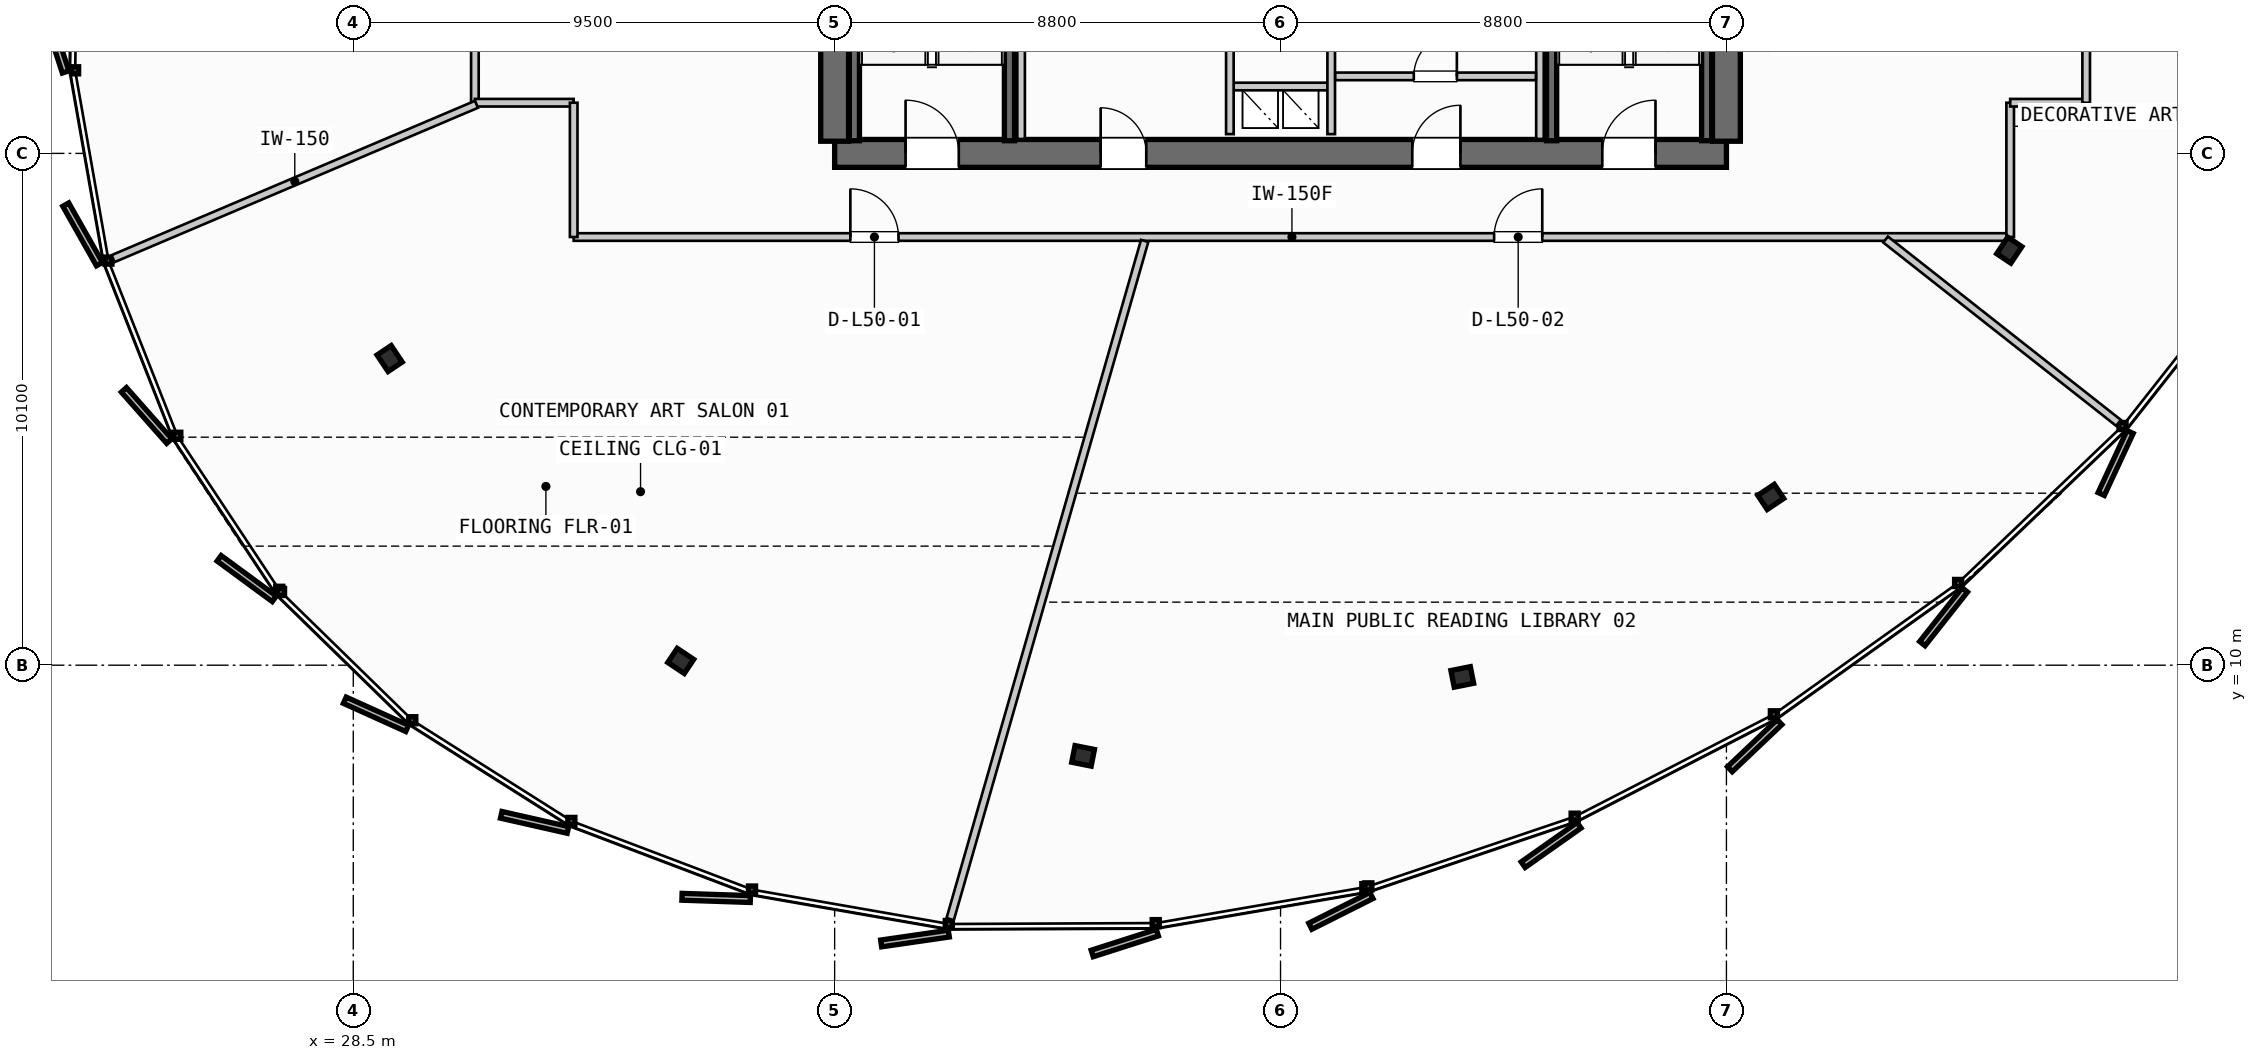
"""IFC4 building model, lengths in metres.
Left out: names, types, materials, properties, quantities, classifications, styles, units other than length and angle.
Written with IfcOpenShell. Run it as: python <this file> out.ifc"""

import sys

from ifc_helpers import new_model, si_unit, direction, frame, frame_2d, origin, origin_2d, place, context, subcontext, project, spatial, rectangle, i_section, extrude, source, transform, mapped, element, fill, save


model = new_model("IFC4")
c1 = context("Model", 3, precision=1e-05, world=origin(), true_north=direction((0.0, 1.0)))
c2 = subcontext(c1, "Body", "Model", "MODEL_VIEW")
j1 = project(units=[si_unit("LENGTHUNIT", "METRE"), si_unit("PLANEANGLEUNIT", "RADIAN")], contexts=[c1])
p1 = place(None, origin())
s1 = spatial("IfcSite", under=j1, at=p1, CompositionType="ELEMENT")
p2 = place(p1, origin())
s2 = spatial("IfcBuilding", under=s1, at=p2, CompositionType="ELEMENT")
p3 = place(p2, frame((0.0, 0.0, 193.9)))
s3 = spatial("IfcBuildingStorey", under=s2, at=p3, CompositionType="ELEMENT", Elevation=193.9)
p4 = place(p3, frame((38.0, 20.1, 0.0), z_axis=(0.0, 0.0, 1.0), x_axis=(1.0, 0.0, 0.0)))
e1 = element("IfcWall", 1, at=p4, inside=s3, PredefinedType="SHEAR", context=c2, shape_type="SweptSolid", body=[
    extrude(rectangle(XDim=17.6, YDim=0.55, at=frame_2d((8.8, 0.0))), origin(), (0.0, 0.0, 1.0), 3.26),
])
p5 = place(p4, frame((1.4, 0.0, 0.0)))
e2 = element("IfcOpeningElement", 2, at=p5, cuts=e1, PredefinedType="OPENING", context=c2, shape_type="SweptSolid", body=[
    extrude(rectangle(XDim=1.05, YDim=2.15, at=frame_2d((0.525, 1.075))), frame((0.0, 0.285, 0.0), z_axis=(0.0, -1.0, 0.0), x_axis=(1.0, 0.0, 0.0)), (0.0, 0.0, 1.0), 0.57),
])
p6 = place(p4, frame((15.15, 0.0, 0.0)))
e3 = element("IfcOpeningElement", 3, at=p6, cuts=e1, PredefinedType="OPENING", context=c2, shape_type="SweptSolid", body=[
    extrude(rectangle(XDim=1.05, YDim=2.15, at=frame_2d((0.525, 1.075))), frame((0.0, 0.285, 0.0), z_axis=(0.0, -1.0, 0.0), x_axis=(1.0, 0.0, 0.0)), (0.0, 0.0, 1.0), 0.57),
])
p7 = place(p4, frame((5.25, 0.0, 0.0)))
e4 = element("IfcOpeningElement", 4, at=p7, cuts=e1, PredefinedType="OPENING", context=c2, shape_type="SweptSolid", body=[
    extrude(rectangle(XDim=0.9, YDim=2.15, at=frame_2d((0.45, 1.075))), frame((0.0, 0.285, 0.0), z_axis=(0.0, -1.0, 0.0), x_axis=(1.0, 0.0, 0.0)), (0.0, 0.0, 1.0), 0.57),
])
p8 = place(p4, frame((11.4, 0.0, 0.0)))
e5 = element("IfcOpeningElement", 5, at=p8, cuts=e1, PredefinedType="OPENING", context=c2, shape_type="SweptSolid", body=[
    extrude(rectangle(XDim=0.95, YDim=2.15, at=frame_2d((0.475, 1.075))), frame((0.0, 0.285, 0.0), z_axis=(0.0, -1.0, 0.0), x_axis=(1.0, 0.0, 0.0)), (0.0, 0.0, 1.0), 0.57),
])
p9 = place(p3, frame((38.0, 35.26, 0.0), z_axis=(0.0, 0.0, 1.0), x_axis=(0.0, -1.0, 0.0)))
e6 = element("IfcWall", 6, at=p9, inside=s3, PredefinedType="SHEAR", context=c2, shape_type="SweptSolid", body=[
    extrude(rectangle(XDim=14.92, YDim=0.55, at=frame_2d((7.46, 0.0))), origin(), (0.0, 0.0, 1.0), 3.26),
])
p10 = place(p9, frame((5.21, 0.0, 0.0)))
e7 = element("IfcOpeningElement", 7, at=p10, cuts=e6, PredefinedType="OPENING", context=c2, shape_type="SweptSolid", body=[
    extrude(rectangle(XDim=1.1, YDim=2.2, at=frame_2d((0.55, 1.1))), frame((0.0, 0.285, 0.0), z_axis=(0.0, -1.0, 0.0), x_axis=(1.0, 0.0, 0.0)), (0.0, 0.0, 1.0), 0.57),
])
p11 = place(p3, frame((55.6, 20.34, 0.0), z_axis=(0.0, 0.0, 1.0), x_axis=(0.0, 1.0, 0.0)))
e8 = element("IfcWall", 8, at=p11, inside=s3, PredefinedType="SHEAR", context=c2, shape_type="SweptSolid", body=[
    extrude(rectangle(XDim=14.92, YDim=0.55, at=frame_2d((7.46, 0.0))), origin(), (0.0, 0.0, 1.0), 3.26),
])
p12 = place(p11, frame((12.71, 0.0, 0.0)))
e9 = element("IfcOpeningElement", 9, at=p12, cuts=e8, PredefinedType="OPENING", context=c2, shape_type="SweptSolid", body=[
    extrude(rectangle(XDim=1.05, YDim=2.15, at=frame_2d((0.525, 1.075))), frame((0.0, 0.285, 0.0), z_axis=(0.0, -1.0, 0.0), x_axis=(1.0, 0.0, 0.0)), (0.0, 0.0, 1.0), 0.57),
])
p13 = place(p11, frame((8.61, 0.0, 0.0)))
e10 = element("IfcOpeningElement", 10, at=p13, cuts=e8, PredefinedType="OPENING", context=c2, shape_type="SweptSolid", body=[
    extrude(rectangle(XDim=1.1, YDim=2.2, at=frame_2d((0.55, 1.1))), frame((0.0, 0.285, 0.0), z_axis=(0.0, -1.0, 0.0), x_axis=(1.0, 0.0, 0.0)), (0.0, 0.0, 1.0), 0.57),
])
m1 = source(origin(), c2, "Body", "SweptSolid", [
    extrude(i_section(OverallWidth=0.391, OverallDepth=0.335, WebThickness=0.023, FlangeThickness=0.034, FilletRadius=0.015, at=origin_2d()), origin(), (0.0, 0.0, 1.0), 3.26),
])
for number, where, z_axis, x_axis in (
    (11, (29.218, 16.052, 0.0), (0.0, 0.0, 1.0), (-0.831, -0.556, 0.0)),
    (12, (34.963, 10.084, 0.0), (0.0, 0.0, 1.0), (-0.556, -0.831, 0.0)),
    (13, (42.904, 8.211, 0.0), (0.0, 0.0, 1.0), (-0.195, -0.981, 0.0)),
    (14, (50.387, 9.769, 0.0), (0.0, 0.0, 1.0), (0.195, -0.981, 0.0)),
    (15, (56.475, 13.321, 0.0), (0.0, 0.0, 1.0), (0.556, -0.831, 0.0)),
    (16, (61.183, 18.19, 0.0), (0.0, 0.0, 1.0), (0.831, -0.556, 0.0)),
):
    element("IfcColumn", number, at=place(p3, frame(where, z_axis=z_axis, x_axis=x_axis)), inside=s3, PredefinedType="COLUMN", context=c2, shape_type="MappedRepresentation", body=[
        mapped(m1, transform((0.0, 0.0, 0.0), scale=1.0)),
    ])
for number, where, z_axis, x_axis in (
    (17, (41.45, 27.7, 0.0), (0.0, 0.0, 1.0), (0.0, -1.0, 0.0)),
    (18, (38.39, 20.35, 0.0), (0.0, 0.0, 1.0), (0.0, 1.0, 0.0)),
    (19, (55.21, 27.7, 0.0), (0.0, 0.0, 1.0), (0.0, -1.0, 0.0)),
    (20, (52.15, 20.35, 0.0), (0.0, 0.0, 1.0), (0.0, 1.0, 0.0)),
):
    element("IfcWall", number, at=place(p3, frame(where, z_axis=z_axis, x_axis=x_axis)), inside=s3, PredefinedType="SHEAR", context=c2, shape_type="SweptSolid", body=[
        extrude(rectangle(XDim=7.35, YDim=0.2, at=frame_2d((3.675, 0.0))), origin(), (0.0, 0.0, 1.0), 3.26),
    ])
p14 = place(p3, frame((45.8, 21.42, 0.0), z_axis=(0.0, 0.0, 1.0), x_axis=(1.0, 0.0, 0.0)))
e21 = element("IfcWall", 21, at=p14, inside=s3, PredefinedType="PARTITIONING", context=c2, shape_type="SweptSolid", body=[
    extrude(rectangle(XDim=2.0, YDim=0.15, at=frame_2d((1.0, 0.0))), origin(), (0.0, 0.0, 1.0), 2.735),
])
for number, where, z_axis, x_axis in (
    (22, (45.8, 20.48, 0.0), (0.0, 0.0, 1.0), (0.0, 1.0, 0.0)),
    (23, (47.8, 20.48, 0.0), (0.0, 0.0, 1.0), (0.0, 1.0, 0.0)),
):
    element("IfcWall", number, at=place(p3, frame(where, z_axis=z_axis, x_axis=x_axis)), inside=s3, PredefinedType="PARTITIONING", context=c2, shape_type="SweptSolid", body=[
        extrude(rectangle(XDim=2.24, YDim=0.15, at=frame_2d((1.12, 0.0))), origin(), (0.0, 0.0, 1.0), 2.735),
    ])
for number, where, z_axis, x_axis in (
    (24, (41.68, 20.385, 0.0), (0.0, 0.0, 1.0), (0.0, 1.0, 0.0)),
    (25, (51.92, 20.385, 0.0), (0.0, 0.0, 1.0), (0.0, 1.0, 0.0)),
):
    element("IfcWall", number, at=place(p3, frame(where, z_axis=z_axis, x_axis=x_axis)), inside=s3, PredefinedType="PARTITIONING", context=c2, shape_type="SweptSolid", body=[
        extrude(rectangle(XDim=2.345, YDim=0.15, at=frame_2d((1.172, 0.0))), origin(), (0.0, 0.0, 1.0), 2.735),
    ])
p15 = place(p3, frame((47.88, 21.62, 0.0), z_axis=(0.0, 0.0, 1.0), x_axis=(1.0, 0.0, 0.0)))
e26 = element("IfcWall", 26, at=p15, inside=s3, PredefinedType="PARTITIONING", context=c2, shape_type="SweptSolid", body=[
    extrude(rectangle(XDim=3.96, YDim=0.15, at=frame_2d((1.98, 0.0))), origin(), (0.0, 0.0, 1.0), 2.735),
])
p16 = place(p15, frame((1.55, 0.0, 0.0)))
e27 = element("IfcOpeningElement", 27, at=p16, cuts=e26, PredefinedType="OPENING", context=c2, shape_type="SweptSolid", body=[
    extrude(rectangle(XDim=0.85, YDim=2.15, at=frame_2d((0.425, 1.075))), frame((0.0, 0.085, 0.0), z_axis=(0.0, -1.0, 0.0), x_axis=(1.0, 0.0, 0.0)), (0.0, 0.0, 1.0), 0.17),
])
p17 = place(p3, frame((32.85, 18.45, 0.0), z_axis=(0.0, 0.0, 1.0), x_axis=(1.0, 0.0, 0.0)))
e28 = element("IfcWall", 28, at=p17, inside=s3, PredefinedType="PARTITIONING", context=c2, shape_type="SweptSolid", body=[
    extrude(rectangle(XDim=28.35, YDim=0.15, at=frame_2d((14.175, 0.0))), origin(), (0.0, 0.0, 1.0), 2.735),
])
p18 = place(p17, frame((5.46, 0.0, 0.0)))
e29 = element("IfcOpeningElement", 29, at=p18, cuts=e28, PredefinedType="OPENING", context=c2, shape_type="SweptSolid", body=[
    extrude(rectangle(XDim=0.95, YDim=2.15, at=frame_2d((0.475, 1.075))), frame((0.0, 0.085, 0.0), z_axis=(0.0, -1.0, 0.0), x_axis=(1.0, 0.0, 0.0)), (0.0, 0.0, 1.0), 0.17),
])
p19 = place(p17, frame((18.165, 0.0, 0.0)))
e30 = element("IfcOpeningElement", 30, at=p19, cuts=e28, PredefinedType="OPENING", context=c2, shape_type="SweptSolid", body=[
    extrude(rectangle(XDim=0.95, YDim=2.15, at=frame_2d((0.475, 1.075))), frame((0.0, 0.085, 0.0), z_axis=(0.0, -1.0, 0.0), x_axis=(1.0, 0.0, 0.0)), (0.0, 0.0, 1.0), 0.17),
])
p20 = place(p3, frame((61.2, 18.45, 0.0), z_axis=(0.0, 0.0, 1.0), x_axis=(0.0, 1.0, 0.0)))
e31 = element("IfcWall", 31, at=p20, inside=s3, PredefinedType="PARTITIONING", context=c2, shape_type="SweptSolid", body=[
    extrude(rectangle(XDim=2.65, YDim=0.15, at=frame_2d((1.325, 0.0))), origin(), (0.0, 0.0, 1.0), 2.735),
])
p21 = place(p3, frame((61.2, 21.1, 0.0), z_axis=(0.0, 0.0, 1.0), x_axis=(1.0, 0.0, 0.0)))
e32 = element("IfcWall", 32, at=p21, inside=s3, PredefinedType="PARTITIONING", context=c2, shape_type="SweptSolid", body=[
    extrude(rectangle(XDim=1.5, YDim=0.15, at=frame_2d((0.75, 0.0))), origin(), (0.0, 0.0, 1.0), 2.735),
])
for number, where, z_axis, x_axis in (
    (33, (62.7, 21.1, 0.0), (0.0, 0.0, 1.0), (0.0, 1.0, 0.0)),
    (34, (30.9, 22.8, 0.0), (0.0, 0.0, 1.0), (0.0, -1.0, 0.0)),
):
    element("IfcWall", number, at=place(p3, frame(where, z_axis=z_axis, x_axis=x_axis)), inside=s3, PredefinedType="PARTITIONING", context=c2, shape_type="SweptSolid", body=[
        extrude(rectangle(XDim=1.7, YDim=0.15, at=frame_2d((0.85, 0.0))), origin(), (0.0, 0.0, 1.0), 2.735),
    ])
p22 = place(p3, frame((30.9, 21.1, 0.0), z_axis=(0.0, 0.0, 1.0), x_axis=(1.0, 0.0, 0.0)))
e35 = element("IfcWall", 35, at=p22, inside=s3, PredefinedType="PARTITIONING", context=c2, shape_type="SweptSolid", body=[
    extrude(rectangle(XDim=1.95, YDim=0.15, at=frame_2d((0.975, 0.0))), origin(), (0.0, 0.0, 1.0), 2.735),
])
p23 = place(p3, frame((32.85, 21.1, 0.0), z_axis=(0.0, 0.0, 1.0), x_axis=(0.0, -1.0, 0.0)))
e36 = element("IfcWall", 36, at=p23, inside=s3, PredefinedType="PARTITIONING", context=c2, shape_type="SweptSolid", body=[
    extrude(rectangle(XDim=2.65, YDim=0.15, at=frame_2d((1.325, 0.0))), origin(), (0.0, 0.0, 1.0), 2.735),
])
p24 = place(p3, frame((30.932, 21.069, 0.0), z_axis=(0.0, 0.0, 1.0), x_axis=(-0.920468749574, -0.390816172973, 0.0)))
e37 = element("IfcWall", 37, at=p24, inside=s3, PredefinedType="PARTITIONING", context=c2, shape_type="SweptSolid", body=[
    extrude(rectangle(XDim=7.792, YDim=0.15, at=frame_2d((3.896, 0.0))), origin(), (0.0, 0.0, 1.0), 2.735),
])
p25 = place(p3, frame((44.119, 18.373, 0.0), z_axis=(0.0, 0.0, 1.0), x_axis=(-0.275658924293, -0.961255511015, 0.0)))
e38 = element("IfcWall", 38, at=p25, inside=s3, PredefinedType="PARTITIONING", context=c2, shape_type="SweptSolid", body=[
    extrude(rectangle(XDim=13.924, YDim=0.15, at=frame_2d((6.962, 0.0))), origin(), (0.0, 0.0, 1.0), 2.735),
])
p26 = place(p3, frame((58.741, 18.4, 0.0), z_axis=(0.0, 0.0, 1.0), x_axis=(0.785786636701, -0.618497664977, 0.0)))
e39 = element("IfcWall", 39, at=p26, inside=s3, PredefinedType="PARTITIONING", context=c2, shape_type="SweptSolid", body=[
    extrude(rectangle(XDim=5.851, YDim=0.15, at=frame_2d((2.925, 0.0))), origin(), (0.0, 0.0, 1.0), 2.735),
])
m2 = source(origin(), c2, "Body", "SweptSolid", [
    extrude(rectangle(XDim=1.05, YDim=2.15, at=frame_2d((0.525, 1.075))), frame((0.0, 0.025, 0.0), z_axis=(0.0, -1.0, 0.0), x_axis=(1.0, 0.0, 0.0)), (0.0, 0.0, 1.0), 0.05),
])
p27 = place(p5, origin())
e40 = element("IfcDoor", 40, at=p27, inside=s3, OperationType="SINGLE_SWING_LEFT", PredefinedType="DOOR", context=c2, shape_type="MappedRepresentation", body=[
    mapped(m2, transform((0.0, 0.0, 0.0), scale=1.0)),
])
fill(e2, e40)
p28 = place(p6, origin())
e41 = element("IfcDoor", 41, at=p28, inside=s3, OperationType="SINGLE_SWING_RIGHT", PredefinedType="DOOR", context=c2, shape_type="MappedRepresentation", body=[
    mapped(m2, transform((0.0, 0.0, 0.0), scale=1.0)),
])
fill(e3, e41)
m3 = source(origin(), c2, "Body", "SweptSolid", [
    extrude(rectangle(XDim=0.9, YDim=2.15, at=frame_2d((0.45, 1.075))), frame((0.0, 0.025, 0.0), z_axis=(0.0, -1.0, 0.0), x_axis=(1.0, 0.0, 0.0)), (0.0, 0.0, 1.0), 0.05),
])
p29 = place(p7, origin())
e42 = element("IfcDoor", 42, at=p29, inside=s3, OperationType="SINGLE_SWING_LEFT", PredefinedType="DOOR", context=c2, shape_type="MappedRepresentation", body=[
    mapped(m3, transform((0.0, 0.0, 0.0), scale=1.0)),
])
fill(e4, e42)
m4 = source(origin(), c2, "Body", "SweptSolid", [
    extrude(rectangle(XDim=0.95, YDim=2.15, at=frame_2d((0.475, 1.075))), frame((0.0, 0.025, 0.0), z_axis=(0.0, -1.0, 0.0), x_axis=(1.0, 0.0, 0.0)), (0.0, 0.0, 1.0), 0.05),
])
p30 = place(p8, origin())
e43 = element("IfcDoor", 43, at=p30, inside=s3, OperationType="SINGLE_SWING_RIGHT", PredefinedType="DOOR", context=c2, shape_type="MappedRepresentation", body=[
    mapped(m4, transform((0.0, 0.0, 0.0), scale=1.0)),
])
fill(e5, e43)
m5 = source(origin(), c2, "Body", "SweptSolid", [
    extrude(rectangle(XDim=0.85, YDim=2.15, at=frame_2d((0.425, 1.075))), frame((0.0, 0.025, 0.0), z_axis=(0.0, -1.0, 0.0), x_axis=(1.0, 0.0, 0.0)), (0.0, 0.0, 1.0), 0.05),
])
p31 = place(p16, origin())
e44 = element("IfcDoor", 44, at=p31, inside=s3, OperationType="SINGLE_SWING_RIGHT", PredefinedType="DOOR", context=c2, shape_type="MappedRepresentation", body=[
    mapped(m5, transform((0.0, 0.0, 0.0), scale=1.0)),
])
fill(e27, e44)
p32 = place(p18, origin())
e45 = element("IfcDoor", 45, at=p32, inside=s3, OperationType="SINGLE_SWING_LEFT", PredefinedType="DOOR", context=c2, shape_type="MappedRepresentation", body=[
    mapped(m4, transform((0.0, 0.0, 0.0), scale=1.0)),
])
fill(e29, e45)
p33 = place(p19, origin())
e46 = element("IfcDoor", 46, at=p33, inside=s3, OperationType="SINGLE_SWING_RIGHT", PredefinedType="DOOR", context=c2, shape_type="MappedRepresentation", body=[
    mapped(m4, transform((0.0, 0.0, 0.0), scale=1.0)),
])
fill(e30, e46)
save(model, sys.argv[1])
